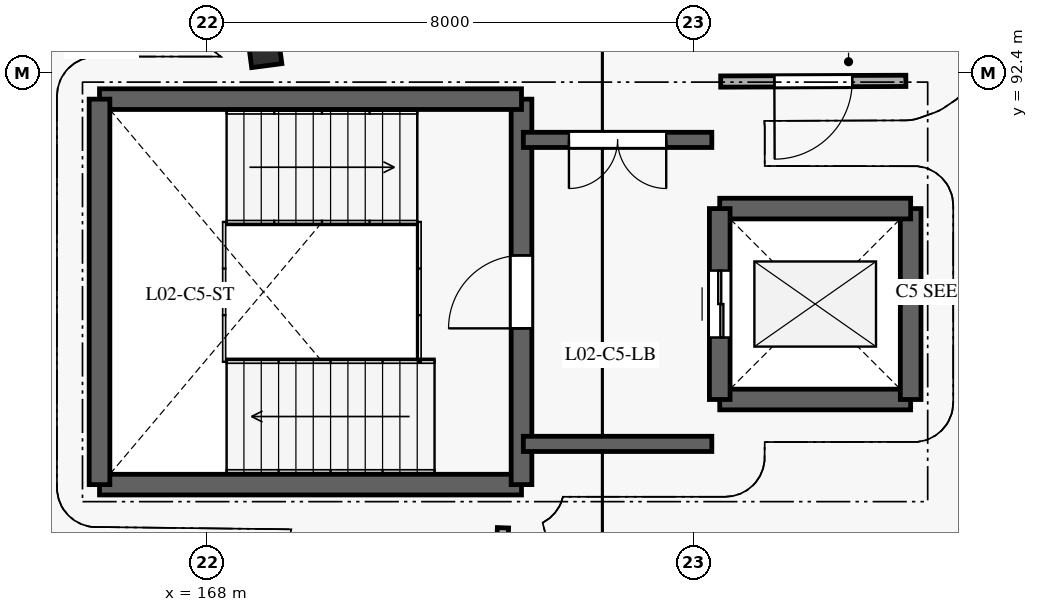
"""IFC4 building model, lengths in metres.
Left out: names, types, materials, properties, quantities, classifications, styles, units other than length and angle.
Written with IfcOpenShell. Run it as: python <this file> out.ifc"""

import sys

from ifc_helpers import new_model, si_unit, direction, frame, frame_2d, origin, origin_2d, place, context, subcontext, project, spatial, rectangle, extrude, element, fill, save


model = new_model("IFC4")
c1 = context("Model", 3, precision=1e-05, world=origin(), true_north=direction((0.0, 1.0)))
c2 = subcontext(c1, "Body", "Model", "MODEL_VIEW")
j1 = project(units=[si_unit("LENGTHUNIT", "METRE"), si_unit("PLANEANGLEUNIT", "RADIAN")], contexts=[c1])
p1 = place(None, origin())
s1 = spatial("IfcSite", under=j1, at=p1, CompositionType="ELEMENT")
p2 = place(p1, origin())
s2 = spatial("IfcBuilding", under=s1, at=p2, CompositionType="ELEMENT")
p3 = place(p2, frame((0.0, 0.0, 8.4)))
s3 = spatial("IfcBuildingStorey", under=s2, at=p3, CompositionType="ELEMENT", Elevation=8.4)
p4 = place(p3, frame((168.948, 92.769, 0.0), z_axis=(0.0, 0.0, 1.0), x_axis=(-0.991444861374, -0.13052619222, 0.0)))
e1 = element("IfcColumn", 1, at=p4, inside=s3, PredefinedType="COLUMN", context=c2, shape_type="SweptSolid", body=[
    extrude(rectangle(XDim=0.5, YDim=0.5, at=origin_2d()), origin(), (0.0, 0.0, 1.0), 4.2),
])
p5 = place(p3, frame((165.723, 81.061, 0.0), z_axis=(0.0, 0.0, 1.0), x_axis=(-0.68021653034, 0.73301123583, 0.0)))
e2 = element("IfcWall", 2, at=p5, inside=s3, PredefinedType="SOLIDWALL", context=c2, shape_type="SweptSolid", body=[
    extrude(rectangle(XDim=6.548, YDim=0.3, at=frame_2d((3.274, 0.0))), origin(), (0.0, 0.0, 1.0), 3.94),
])
p6 = place(p5, frame((1.162, 0.0, 0.85)))
e3 = element("IfcOpeningElement", 3, at=p6, cuts=e2, PredefinedType="OPENING", context=c2, shape_type="SweptSolid", body=[
    extrude(rectangle(XDim=0.95, YDim=1.4, at=frame_2d((0.475, 0.7))), frame((0.0, 0.16, 0.0), z_axis=(0.0, -1.0, 0.0), x_axis=(1.0, 0.0, 0.0)), (0.0, 0.0, 1.0), 0.32),
])
p7 = place(p5, frame((4.361, 0.0, 0.85)))
e4 = element("IfcOpeningElement", 4, at=p7, cuts=e2, PredefinedType="OPENING", context=c2, shape_type="SweptSolid", body=[
    extrude(rectangle(XDim=1.1, YDim=1.4, at=frame_2d((0.55, 0.7))), frame((0.0, 0.16, 0.0), z_axis=(0.0, -1.0, 0.0), x_axis=(1.0, 0.0, 0.0)), (0.0, 0.0, 1.0), 0.32),
])
p8 = place(p3, frame((166.23, 85.63, 0.0), z_axis=(0.0, 0.0, 1.0), x_axis=(1.0, 0.0, 0.0)))
e5 = element("IfcWall", 5, at=p8, inside=s3, PredefinedType="SHEAR", context=c2, shape_type="SweptSolid", body=[
    extrude(rectangle(XDim=6.94, YDim=0.34, at=frame_2d((3.47, 0.0))), origin(), (0.0, 0.0, 1.0), 3.95),
])
p9 = place(p3, frame((173.17, 85.63, 0.0), z_axis=(0.0, 0.0, 1.0), x_axis=(0.0, 1.0, 0.0)))
e6 = element("IfcWall", 6, at=p9, inside=s3, PredefinedType="SHEAR", context=c2, shape_type="SweptSolid", body=[
    extrude(rectangle(XDim=6.34, YDim=0.34, at=frame_2d((3.17, 0.0))), origin(), (0.0, 0.0, 1.0), 3.95),
])
p10 = place(p9, frame((2.57, 0.0, 0.0)))
e7 = element("IfcOpeningElement", 7, at=p10, cuts=e6, PredefinedType="OPENING", context=c2, shape_type="SweptSolid", body=[
    extrude(rectangle(XDim=1.2, YDim=2.1, at=frame_2d((0.6, 1.05))), frame((0.0, 0.18, 0.0), z_axis=(0.0, -1.0, 0.0), x_axis=(1.0, 0.0, 0.0)), (0.0, 0.0, 1.0), 0.36),
])
p11 = place(p3, frame((173.17, 91.97, 0.0), z_axis=(0.0, 0.0, 1.0), x_axis=(-1.0, 0.0, 0.0)))
e8 = element("IfcWall", 8, at=p11, inside=s3, PredefinedType="SHEAR", context=c2, shape_type="SweptSolid", body=[
    extrude(rectangle(XDim=6.94, YDim=0.34, at=frame_2d((3.47, 0.0))), origin(), (0.0, 0.0, 1.0), 3.95),
])
p12 = place(p3, frame((166.23, 91.97, 0.0), z_axis=(0.0, 0.0, 1.0), x_axis=(0.0, -1.0, 0.0)))
e9 = element("IfcWall", 9, at=p12, inside=s3, PredefinedType="SHEAR", context=c2, shape_type="SweptSolid", body=[
    extrude(rectangle(XDim=6.34, YDim=0.34, at=frame_2d((3.17, 0.0))), origin(), (0.0, 0.0, 1.0), 3.95),
])
p13 = place(p3, frame((176.43, 87.03, 0.0), z_axis=(0.0, 0.0, 1.0), x_axis=(1.0, 0.0, 0.0)))
e10 = element("IfcWall", 10, at=p13, inside=s3, PredefinedType="SHEAR", context=c2, shape_type="SweptSolid", body=[
    extrude(rectangle(XDim=3.14, YDim=0.34, at=frame_2d((1.57, 0.0))), origin(), (0.0, 0.0, 1.0), 3.95),
])
p14 = place(p3, frame((179.57, 87.03, 0.0), z_axis=(0.0, 0.0, 1.0), x_axis=(0.0, 1.0, 0.0)))
e11 = element("IfcWall", 11, at=p14, inside=s3, PredefinedType="SHEAR", context=c2, shape_type="SweptSolid", body=[
    extrude(rectangle(XDim=3.14, YDim=0.34, at=frame_2d((1.57, 0.0))), origin(), (0.0, 0.0, 1.0), 3.95),
])
p15 = place(p3, frame((179.57, 90.17, 0.0), z_axis=(0.0, 0.0, 1.0), x_axis=(-1.0, 0.0, 0.0)))
e12 = element("IfcWall", 12, at=p15, inside=s3, PredefinedType="SHEAR", context=c2, shape_type="SweptSolid", body=[
    extrude(rectangle(XDim=3.14, YDim=0.34, at=frame_2d((1.57, 0.0))), origin(), (0.0, 0.0, 1.0), 3.95),
])
p16 = place(p3, frame((176.43, 90.17, 0.0), z_axis=(0.0, 0.0, 1.0), x_axis=(0.0, -1.0, 0.0)))
e13 = element("IfcWall", 13, at=p16, inside=s3, PredefinedType="SHEAR", context=c2, shape_type="SweptSolid", body=[
    extrude(rectangle(XDim=3.14, YDim=0.34, at=frame_2d((1.57, 0.0))), origin(), (0.0, 0.0, 1.0), 3.95),
])
p17 = place(p16, frame((1.02, 0.0, 0.0)))
e14 = element("IfcOpeningElement", 14, at=p17, cuts=e13, PredefinedType="OPENING", context=c2, shape_type="SweptSolid", body=[
    extrude(rectangle(XDim=1.1, YDim=2.1, at=frame_2d((0.55, 1.05))), frame((0.0, 0.18, 0.0), z_axis=(0.0, -1.0, 0.0), x_axis=(1.0, 0.0, 0.0)), (0.0, 0.0, 1.0), 0.36),
])
p18 = place(p3, frame((173.2, 86.3, 0.0), z_axis=(0.0, 0.0, 1.0), x_axis=(1.0, 0.0, 0.0)))
e15 = element("IfcWall", 15, at=p18, inside=s3, PredefinedType="SHEAR", context=c2, shape_type="SweptSolid", body=[
    extrude(rectangle(XDim=3.1, YDim=0.25, at=frame_2d((1.55, 0.0))), origin(), (0.0, 0.0, 1.0), 3.95),
])
p19 = place(p3, frame((176.3, 91.3, 0.0), z_axis=(0.0, 0.0, 1.0), x_axis=(-1.0, 0.0, 0.0)))
e16 = element("IfcWall", 16, at=p19, inside=s3, PredefinedType="SHEAR", context=c2, shape_type="SweptSolid", body=[
    extrude(rectangle(XDim=3.1, YDim=0.25, at=frame_2d((1.55, 0.0))), origin(), (0.0, 0.0, 1.0), 3.95),
])
p20 = place(p19, frame((0.75, 0.0, 0.0)))
e17 = element("IfcOpeningElement", 17, at=p20, cuts=e16, PredefinedType="OPENING", context=c2, shape_type="SweptSolid", body=[
    extrude(rectangle(XDim=1.6, YDim=2.15, at=frame_2d((0.8, 1.075))), frame((0.0, 0.135, 0.0), z_axis=(0.0, -1.0, 0.0), x_axis=(1.0, 0.0, 0.0)), (0.0, 0.0, 1.0), 0.27),
])
p21 = place(p3, frame((172.865, 84.92, 0.0), z_axis=(0.0, 0.0, 1.0), x_axis=(-0.03562358123, -0.999365278795, 0.0)))
e18 = element("IfcWall", 18, at=p21, inside=s3, PredefinedType="PARTITIONING", context=c2, shape_type="SweptSolid", body=[
    extrude(rectangle(XDim=3.845, YDim=0.185, at=frame_2d((1.922, 0.0))), origin(), (0.0, 0.0, 1.0), 3.9),
])
p22 = place(p3, frame((179.491, 92.271, 0.0), z_axis=(0.0, 0.0, 1.0), x_axis=(-0.999993200613, -0.00368764528, 0.0)))
e19 = element("IfcWall", 19, at=p22, inside=s3, PredefinedType="PARTITIONING", context=c2, shape_type="SweptSolid", body=[
    extrude(rectangle(XDim=3.045, YDim=0.185, at=frame_2d((1.523, 0.0))), origin(), (0.0, 0.0, 1.0), 3.9),
])
p23 = place(p22, frame((0.883, 0.0, 0.0)))
e20 = element("IfcOpeningElement", 20, at=p23, cuts=e19, PredefinedType="OPENING", context=c2, shape_type="SweptSolid", body=[
    extrude(rectangle(XDim=1.28, YDim=2.14, at=frame_2d((0.64, 1.07))), frame((0.0, 0.103, 0.0), z_axis=(0.0, -1.0, 0.0), x_axis=(1.0, 0.0, 0.0)), (0.0, 0.0, 1.0), 0.205),
])
p24 = place(p10, origin())
e21 = element("IfcDoor", 21, at=p24, inside=s3, OperationType="SINGLE_SWING_LEFT", PredefinedType="DOOR", context=c2, shape_type="SweptSolid", body=[
    extrude(rectangle(XDim=1.2, YDim=2.1, at=frame_2d((0.6, 1.05))), frame((0.0, 0.025, 0.0), z_axis=(0.0, -1.0, 0.0), x_axis=(1.0, 0.0, 0.0)), (0.0, 0.0, 1.0), 0.05),
])
fill(e7, e21)
p25 = place(p17, frame((1.1, 0.0, 0.0), z_axis=(0.0, 0.0, 1.0), x_axis=(-1.0, 0.0, 0.0)))
e22 = element("IfcDoor", 22, at=p25, inside=s3, OperationType="DOUBLE_DOOR_SLIDING", PredefinedType="DOOR", context=c2, shape_type="SweptSolid", body=[
    extrude(rectangle(XDim=1.1, YDim=2.1, at=frame_2d((0.55, 1.05))), frame((0.0, 0.025, 0.0), z_axis=(0.0, -1.0, 0.0), x_axis=(1.0, 0.0, 0.0)), (0.0, 0.0, 1.0), 0.05),
])
fill(e14, e22)
p26 = place(p20, origin())
e23 = element("IfcDoor", 23, at=p26, inside=s3, OperationType="DOUBLE_DOOR_SINGLE_SWING", PredefinedType="DOOR", context=c2, shape_type="SweptSolid", body=[
    extrude(rectangle(XDim=1.6, YDim=2.15, at=frame_2d((0.8, 1.075))), frame((0.0, 0.025, 0.0), z_axis=(0.0, -1.0, 0.0), x_axis=(1.0, 0.0, 0.0)), (0.0, 0.0, 1.0), 0.05),
])
fill(e17, e23)
p27 = place(p23, origin())
e24 = element("IfcDoor", 24, at=p27, inside=s3, OperationType="SINGLE_SWING_RIGHT", PredefinedType="DOOR", context=c2, shape_type="SweptSolid", body=[
    extrude(rectangle(XDim=1.28, YDim=2.14, at=frame_2d((0.64, 1.07))), frame((0.0, 0.025, 0.0), z_axis=(0.0, -1.0, 0.0), x_axis=(1.0, 0.0, 0.0)), (0.0, 0.0, 1.0), 0.05),
])
fill(e20, e24)
save(model, sys.argv[1])
